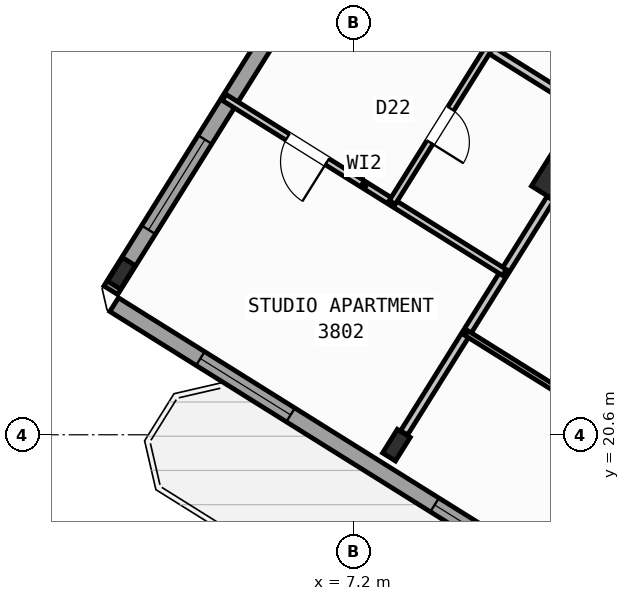
"""IFC4 building model, lengths in metres.
Left out: names, types, materials, properties, quantities, classifications, styles, units other than length and angle.
Written with IfcOpenShell. Run it as: python <this file> out.ifc"""

import sys

from ifc_helpers import new_model, si_unit, direction, frame, frame_2d, origin, origin_2d, place, context, subcontext, project, spatial, rectangle, hollow_rectangle, i_section, extrude, source, transform, mapped, element, fill, save


model = new_model("IFC4")
c1 = context("Model", 3, precision=1e-05, world=origin(), true_north=direction((0.0, 1.0)))
c2 = subcontext(c1, "Body", "Model", "MODEL_VIEW")
j1 = project(units=[si_unit("LENGTHUNIT", "METRE"), si_unit("PLANEANGLEUNIT", "RADIAN")], contexts=[c1])
p1 = place(None, origin())
s1 = spatial("IfcSite", under=j1, at=p1, CompositionType="ELEMENT")
p2 = place(p1, origin())
s2 = spatial("IfcBuilding", under=s1, at=p2, CompositionType="ELEMENT")
p3 = place(p2, frame((0.0, 0.0, 151.5)))
s3 = spatial("IfcBuildingStorey", under=s2, at=p3, CompositionType="ELEMENT", Elevation=151.5)
m1 = source(origin(), c2, "Body", "SweptSolid", [
    extrude(hollow_rectangle(XDim=0.9, YDim=0.9, WallThickness=0.036, at=origin_2d()), origin(), (0.0, 0.0, 1.0), 3.6),
])
p4 = place(p3, frame((11.336, 25.653, 0.0), z_axis=(0.0, 0.0, 1.0), x_axis=(-0.848048096156, 0.529919264233, 0.0)))
e1 = element("IfcColumn", 1, at=p4, inside=s3, PredefinedType="COLUMN", context=c2, shape_type="MappedRepresentation", body=[
    mapped(m1, transform((0.0, 0.0, 0.0), scale=1.0)),
])
m2 = source(origin(), c2, "Body", "SweptSolid", [
    extrude(i_section(OverallWidth=0.3, OverallDepth=0.55, WebThickness=0.015, FlangeThickness=0.029, at=origin_2d()), origin(), (0.0, 0.0, 1.0), 3.6),
])
for number, where, z_axis, x_axis in (
    (2, (8.051, 20.395, 0.0), (0.0, 0.0, 1.0), (-0.848, 0.53, 0.0)),
    (3, (2.623, 23.786, 0.0), (0.0, 0.0, 1.0), (-0.848, 0.53, 0.0)),
):
    element("IfcColumn", number, at=place(p3, frame(where, z_axis=z_axis, x_axis=x_axis)), inside=s3, PredefinedType="COLUMN", context=c2, shape_type="MappedRepresentation", body=[
        mapped(m2, transform((0.0, 0.0, 0.0), scale=1.0)),
    ])
p5 = place(p3, frame((29.268, 6.429, 0.0), z_axis=(0.0, 0.0, 1.0), x_axis=(-0.848049971435, 0.529916263149, 0.0)))
e4 = element("IfcWall", 4, at=p5, inside=s3, PredefinedType="STANDARD", context=c2, shape_type="SweptSolid", body=[
    extrude(rectangle(XDim=31.588, YDim=0.32, at=frame_2d((15.794, 0.0))), origin(), (0.0, 0.0, 1.0), 3.35),
])
p6 = place(p5, frame((16.362, 0.0, 0.0)))
e5 = element("IfcOpeningElement", 5, at=p6, cuts=e4, PredefinedType="OPENING", context=c2, shape_type="SweptSolid", body=[
    extrude(rectangle(XDim=1.2, YDim=2.15, at=frame_2d((0.6, 1.075))), frame((0.0, 0.17, 0.0), z_axis=(0.0, -1.0, 0.0), x_axis=(1.0, 0.0, 0.0)), (0.0, 0.0, 1.0), 0.34),
])
p7 = place(p5, frame((2.989, 0.0, 0.8)))
e6 = element("IfcOpeningElement", 6, at=p7, cuts=e4, PredefinedType="OPENING", context=c2, shape_type="SweptSolid", body=[
    extrude(rectangle(XDim=2.1, YDim=1.55, at=frame_2d((1.05, 0.775))), frame((0.0, 0.17, 0.0), z_axis=(0.0, -1.0, 0.0), x_axis=(1.0, 0.0, 0.0)), (0.0, 0.0, 1.0), 0.34),
])
p8 = place(p5, frame((8.359, 0.0, 0.8)))
e7 = element("IfcOpeningElement", 7, at=p8, cuts=e4, PredefinedType="OPENING", context=c2, shape_type="SweptSolid", body=[
    extrude(rectangle(XDim=2.1, YDim=1.55, at=frame_2d((1.05, 0.775))), frame((0.0, 0.17, 0.0), z_axis=(0.0, -1.0, 0.0), x_axis=(1.0, 0.0, 0.0)), (0.0, 0.0, 1.0), 0.34),
])
p9 = place(p5, frame((13.284, 0.0, 0.95)))
e8 = element("IfcOpeningElement", 8, at=p9, cuts=e4, PredefinedType="OPENING", context=c2, shape_type="SweptSolid", body=[
    extrude(rectangle(XDim=1.2, YDim=1.4, at=frame_2d((0.6, 0.7))), frame((0.0, 0.17, 0.0), z_axis=(0.0, -1.0, 0.0), x_axis=(1.0, 0.0, 0.0)), (0.0, 0.0, 1.0), 0.34),
])
p10 = place(p5, frame((20.259, 0.0, 0.95)))
e9 = element("IfcOpeningElement", 9, at=p10, cuts=e4, PredefinedType="OPENING", context=c2, shape_type="SweptSolid", body=[
    extrude(rectangle(XDim=1.2, YDim=1.4, at=frame_2d((0.6, 0.7))), frame((0.0, 0.17, 0.0), z_axis=(0.0, -1.0, 0.0), x_axis=(1.0, 0.0, 0.0)), (0.0, 0.0, 1.0), 0.34),
])
p11 = place(p5, frame((22.929, 0.0, 0.95)))
e10 = element("IfcOpeningElement", 10, at=p11, cuts=e4, PredefinedType="OPENING", context=c2, shape_type="SweptSolid", body=[
    extrude(rectangle(XDim=1.2, YDim=1.4, at=frame_2d((0.6, 0.7))), frame((0.0, 0.17, 0.0), z_axis=(0.0, -1.0, 0.0), x_axis=(1.0, 0.0, 0.0)), (0.0, 0.0, 1.0), 0.34),
])
p12 = place(p5, frame((27.481, 0.0, 0.8)))
e11 = element("IfcOpeningElement", 11, at=p12, cuts=e4, PredefinedType="OPENING", context=c2, shape_type="SweptSolid", body=[
    extrude(rectangle(XDim=2.1, YDim=1.55, at=frame_2d((1.05, 0.775))), frame((0.0, 0.17, 0.0), z_axis=(0.0, -1.0, 0.0), x_axis=(1.0, 0.0, 0.0)), (0.0, 0.0, 1.0), 0.34),
])
p13 = place(p3, frame((2.415, 23.452, 0.0), z_axis=(0.0, 0.0, 1.0), x_axis=(0.52991049553, 0.848053575387, 0.0)))
e12 = element("IfcWall", 12, at=p13, inside=s3, PredefinedType="STANDARD", context=c2, shape_type="SweptSolid", body=[
    extrude(rectangle(XDim=21.587, YDim=0.32, at=frame_2d((10.794, 0.0))), origin(), (0.0, 0.0, 1.0), 2.775),
])
p14 = place(p13, frame((1.406, 0.0, 0.8)))
e13 = element("IfcOpeningElement", 13, at=p14, cuts=e12, PredefinedType="OPENING", context=c2, shape_type="SweptSolid", body=[
    extrude(rectangle(XDim=2.1, YDim=1.55, at=frame_2d((1.05, 0.775))), frame((0.0, 0.17, 0.0), z_axis=(0.0, -1.0, 0.0), x_axis=(1.0, 0.0, 0.0)), (0.0, 0.0, 1.0), 0.34),
])
p15 = place(p13, frame((10.949, 0.0, 1.0)))
e14 = element("IfcOpeningElement", 14, at=p15, cuts=e12, PredefinedType="OPENING", context=c2, shape_type="SweptSolid", body=[
    extrude(rectangle(XDim=0.9, YDim=1.25, at=frame_2d((0.45, 0.625))), frame((0.0, 0.17, 0.0), z_axis=(0.0, -1.0, 0.0), x_axis=(1.0, 0.0, 0.0)), (0.0, 0.0, 1.0), 0.34),
])
p16 = place(p13, frame((15.369, 0.0, 0.85)))
e15 = element("IfcOpeningElement", 15, at=p16, cuts=e12, PredefinedType="OPENING", context=c2, shape_type="SweptSolid", body=[
    extrude(rectangle(XDim=1.5, YDim=1.5, at=frame_2d((0.75, 0.75))), frame((0.0, 0.17, 0.0), z_axis=(0.0, -1.0, 0.0), x_axis=(1.0, 0.0, 0.0)), (0.0, 0.0, 1.0), 0.34),
])
p17 = place(p13, frame((18.219, 0.0, 0.85)))
e16 = element("IfcOpeningElement", 16, at=p17, cuts=e12, PredefinedType="OPENING", context=c2, shape_type="SweptSolid", body=[
    extrude(rectangle(XDim=1.5, YDim=1.5, at=frame_2d((0.75, 0.75))), frame((0.0, 0.17, 0.0), z_axis=(0.0, -1.0, 0.0), x_axis=(1.0, 0.0, 0.0)), (0.0, 0.0, 1.0), 0.34),
])
p18 = place(p3, frame((21.885, 23.306, 0.0), z_axis=(0.0, 0.0, 1.0), x_axis=(-0.848052408131, 0.529912363569, 0.0)))
e17 = element("IfcWall", 17, at=p18, inside=s3, PredefinedType="PARTITIONING", context=c2, shape_type="SweptSolid", body=[
    extrude(rectangle(XDim=16.73, YDim=0.16, at=frame_2d((8.365, 0.0))), origin(), (0.0, 0.0, 1.0), 3.34),
])
p19 = place(p18, frame((1.395, 0.0, 0.0)))
e18 = element("IfcOpeningElement", 18, at=p19, cuts=e17, PredefinedType="OPENING", context=c2, shape_type="SweptSolid", body=[
    extrude(rectangle(XDim=1.0, YDim=2.1, at=frame_2d((0.5, 1.05))), frame((0.0, 0.09, 0.0), z_axis=(0.0, -1.0, 0.0), x_axis=(1.0, 0.0, 0.0)), (0.0, 0.0, 1.0), 0.18),
])
p20 = place(p18, frame((7.82, 0.0, 0.0)))
e19 = element("IfcOpeningElement", 19, at=p20, cuts=e17, PredefinedType="OPENING", context=c2, shape_type="SweptSolid", body=[
    extrude(rectangle(XDim=1.0, YDim=2.1, at=frame_2d((0.5, 1.05))), frame((0.0, 0.09, 0.0), z_axis=(0.0, -1.0, 0.0), x_axis=(1.0, 0.0, 0.0)), (0.0, 0.0, 1.0), 0.18),
])
p21 = place(p18, frame((11.14, 0.0, 0.0)))
e20 = element("IfcOpeningElement", 20, at=p21, cuts=e17, PredefinedType="OPENING", context=c2, shape_type="SweptSolid", body=[
    extrude(rectangle(XDim=1.0, YDim=2.1, at=frame_2d((0.5, 1.05))), frame((0.0, 0.09, 0.0), z_axis=(0.0, -1.0, 0.0), x_axis=(1.0, 0.0, 0.0)), (0.0, 0.0, 1.0), 0.18),
])
p22 = place(p3, frame((20.719, 21.44, 0.0), z_axis=(0.0, 0.0, 1.0), x_axis=(-0.848048310262, 0.529918921593, 0.0)))
e21 = element("IfcWall", 21, at=p22, inside=s3, PredefinedType="PARTITIONING", context=c2, shape_type="SweptSolid", body=[
    extrude(rectangle(XDim=16.73, YDim=0.16, at=frame_2d((8.365, 0.0))), origin(), (0.0, 0.0, 1.0), 3.34),
])
p23 = place(p22, frame((2.22, 0.0, 0.0)))
e22 = element("IfcOpeningElement", 22, at=p23, cuts=e21, PredefinedType="OPENING", context=c2, shape_type="SweptSolid", body=[
    extrude(rectangle(XDim=0.86, YDim=2.05, at=frame_2d((0.43, 1.025))), frame((0.0, 0.09, 0.0), z_axis=(0.0, -1.0, 0.0), x_axis=(1.0, 0.0, 0.0)), (0.0, 0.0, 1.0), 0.18),
])
p24 = place(p22, frame((6.49, 0.0, 0.0)))
e23 = element("IfcOpeningElement", 23, at=p24, cuts=e21, PredefinedType="OPENING", context=c2, shape_type="SweptSolid", body=[
    extrude(rectangle(XDim=1.0, YDim=2.1, at=frame_2d((0.5, 1.05))), frame((0.0, 0.09, 0.0), z_axis=(0.0, -1.0, 0.0), x_axis=(1.0, 0.0, 0.0)), (0.0, 0.0, 1.0), 0.18),
])
p25 = place(p22, frame((14.304, 0.0, 0.0)))
e24 = element("IfcOpeningElement", 24, at=p25, cuts=e21, PredefinedType="OPENING", context=c2, shape_type="SweptSolid", body=[
    extrude(rectangle(XDim=1.0, YDim=2.1, at=frame_2d((0.5, 1.05))), frame((0.0, 0.09, 0.0), z_axis=(0.0, -1.0, 0.0), x_axis=(1.0, 0.0, 0.0)), (0.0, 0.0, 1.0), 0.18),
])
p26 = place(p3, frame((11.091, 25.261, 0.0), z_axis=(0.0, 0.0, 1.0), x_axis=(-0.52994257524, -0.848033529377, 0.0)))
e25 = element("IfcWall", 25, at=p26, inside=s3, PredefinedType="PARTITIONING", context=c2, shape_type="SweptSolid", body=[
    extrude(rectangle(XDim=5.451, YDim=0.16, at=frame_2d((2.726, 0.0))), origin(), (0.0, 0.0, 1.0), 2.775),
])
p27 = place(p3, frame((14.86, 19.215, 0.0), z_axis=(0.0, 0.0, 1.0), x_axis=(-0.848039019877, 0.529933789039, 0.0)))
e26 = element("IfcWall", 26, at=p27, inside=s3, PredefinedType="PARTITIONING", context=c2, shape_type="SweptSolid", body=[
    extrude(rectangle(XDim=6.4, YDim=0.11, at=frame_2d((3.2, 0.0))), origin(), (0.0, 0.0, 1.0), 3.34),
])
p28 = place(p27, frame((2.74, 0.0, 0.0)))
e27 = element("IfcOpeningElement", 27, at=p28, cuts=e26, PredefinedType="OPENING", context=c2, shape_type="SweptSolid", body=[
    extrude(rectangle(XDim=0.92, YDim=2.08, at=frame_2d((0.46, 1.04))), frame((0.0, 0.065, 0.0), z_axis=(0.0, -1.0, 0.0), x_axis=(1.0, 0.0, 0.0)), (0.0, 0.0, 1.0), 0.13),
])
p29 = place(p3, frame((10.181, 23.804, 0.0), z_axis=(0.0, 0.0, 1.0), x_axis=(-0.848065614912, 0.529891227332, 0.0)))
e28 = element("IfcWall", 28, at=p29, inside=s3, PredefinedType="PLUMBINGWALL", context=c2, shape_type="SweptSolid", body=[
    extrude(rectangle(XDim=6.52, YDim=0.14, at=frame_2d((3.26, 0.0))), origin(), (0.0, 0.0, 1.0), 3.34),
])
p30 = place(p29, frame((4.124, 0.0, 0.0)))
e29 = element("IfcOpeningElement", 29, at=p30, cuts=e28, PredefinedType="OPENING", context=c2, shape_type="SweptSolid", body=[
    extrude(rectangle(XDim=0.92, YDim=2.08, at=frame_2d((0.46, 1.04))), frame((0.0, 0.08, 0.0), z_axis=(0.0, -1.0, 0.0), x_axis=(1.0, 0.0, 0.0)), (0.0, 0.0, 1.0), 0.16),
])
p31 = place(p3, frame((9.866, 28.222, 0.0), z_axis=(0.0, 0.0, 1.0), x_axis=(-0.529876336437, -0.84807491891, 0.0)))
e30 = element("IfcWall", 30, at=p31, inside=s3, PredefinedType="PLUMBINGWALL", context=c2, shape_type="SweptSolid", body=[
    extrude(rectangle(XDim=3.58, YDim=0.14, at=frame_2d((1.79, 0.0))), origin(), (0.0, 0.0, 1.0), 3.34),
])
p32 = place(p31, frame((1.4, 0.0, 0.0)))
e31 = element("IfcOpeningElement", 31, at=p32, cuts=e30, PredefinedType="OPENING", context=c2, shape_type="SweptSolid", body=[
    extrude(rectangle(XDim=0.78, YDim=2.05, at=frame_2d((0.39, 1.025))), frame((0.0, 0.08, 0.0), z_axis=(0.0, -1.0, 0.0), x_axis=(1.0, 0.0, 0.0)), (0.0, 0.0, 1.0), 0.16),
])
m3 = source(origin(), c2, "Body", "SweptSolid", [
    extrude(rectangle(XDim=1.2, YDim=1.4, at=frame_2d((0.6, 0.7))), frame((0.0, 0.03, 0.0), z_axis=(0.0, -1.0, 0.0), x_axis=(1.0, 0.0, 0.0)), (0.0, 0.0, 1.0), 0.06),
])
p33 = place(p11, origin())
e32 = element("IfcWindow", 32, at=p33, inside=s3, PartitioningType="SINGLE_PANEL", PredefinedType="WINDOW", context=c2, shape_type="MappedRepresentation", body=[
    mapped(m3, transform((0.0, 0.0, 0.0), scale=1.0)),
])
fill(e10, e32)
m4 = source(origin(), c2, "Body", "SweptSolid", [
    extrude(rectangle(XDim=2.1, YDim=1.55, at=frame_2d((1.05, 0.775))), frame((0.0, 0.03, 0.0), z_axis=(0.0, -1.0, 0.0), x_axis=(1.0, 0.0, 0.0)), (0.0, 0.0, 1.0), 0.06),
])
p34 = place(p12, origin())
e33 = element("IfcWindow", 33, at=p34, inside=s3, PartitioningType="SINGLE_PANEL", PredefinedType="WINDOW", context=c2, shape_type="MappedRepresentation", body=[
    mapped(m4, transform((0.0, 0.0, 0.0), scale=1.0)),
])
fill(e11, e33)
p35 = place(p14, origin())
e34 = element("IfcWindow", 34, at=p35, inside=s3, PartitioningType="SINGLE_PANEL", PredefinedType="WINDOW", context=c2, shape_type="MappedRepresentation", body=[
    mapped(m4, transform((0.0, 0.0, 0.0), scale=1.0)),
])
fill(e13, e34)
m5 = source(origin(), c2, "Body", "SweptSolid", [
    extrude(rectangle(XDim=0.92, YDim=2.08, at=frame_2d((0.46, 1.04))), frame((0.0, 0.025, 0.0), z_axis=(0.0, -1.0, 0.0), x_axis=(1.0, 0.0, 0.0)), (0.0, 0.0, 1.0), 0.05),
])
p36 = place(p30, origin())
e35 = element("IfcDoor", 35, at=p36, inside=s3, OperationType="SINGLE_SWING_LEFT", PredefinedType="DOOR", context=c2, shape_type="MappedRepresentation", body=[
    mapped(m5, transform((0.0, 0.0, 0.0), scale=1.0)),
])
fill(e29, e35)
m6 = source(origin(), c2, "Body", "SweptSolid", [
    extrude(rectangle(XDim=0.78, YDim=2.05, at=frame_2d((0.39, 1.025))), frame((0.0, 0.025, 0.0), z_axis=(0.0, -1.0, 0.0), x_axis=(1.0, 0.0, 0.0)), (0.0, 0.0, 1.0), 0.05),
])
p37 = place(p32, origin())
e36 = element("IfcDoor", 36, at=p37, inside=s3, OperationType="SINGLE_SWING_RIGHT", PredefinedType="DOOR", context=c2, shape_type="MappedRepresentation", body=[
    mapped(m6, transform((0.0, 0.0, 0.0), scale=1.0)),
])
fill(e31, e36)
save(model, sys.argv[1])
